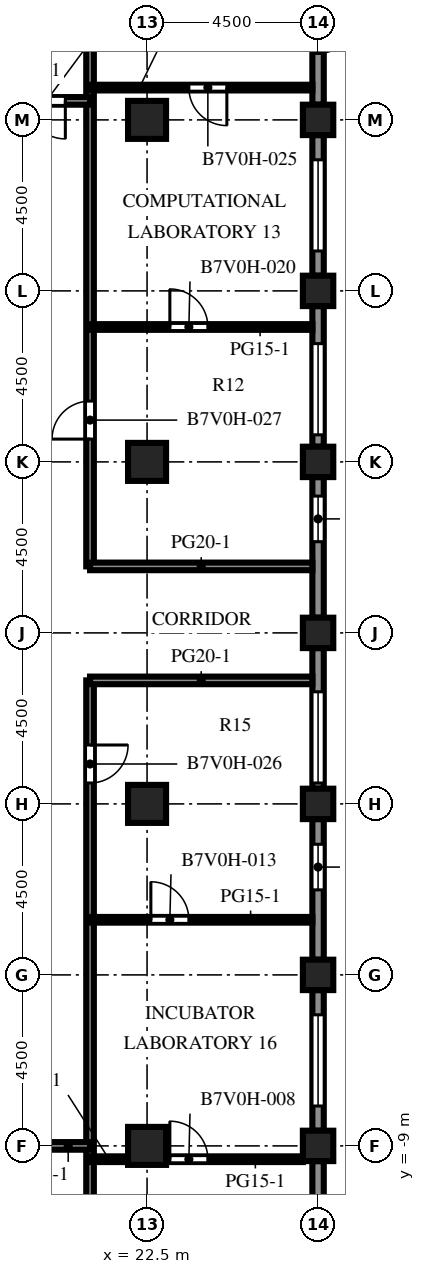
"""IFC4 building model, lengths in metres.
Left out: names, types, materials, properties, quantities, classifications, styles, units other than length and angle.
Written with IfcOpenShell. Run it as: python <this file> out.ifc"""

import sys

from ifc_helpers import new_model, si_unit, direction, frame, frame_2d, origin, origin_2d, place, context, subcontext, project, spatial, rectangle, extrude, element, fill, save


model = new_model("IFC4")
c1 = context("Model", 3, precision=1e-05, world=origin(), true_north=direction((0.0, 1.0)))
c2 = subcontext(c1, "Body", "Model", "MODEL_VIEW")
j1 = project(units=[si_unit("LENGTHUNIT", "METRE"), si_unit("PLANEANGLEUNIT", "RADIAN")], contexts=[c1])
p1 = place(None, origin())
s1 = spatial("IfcSite", under=j1, at=p1, CompositionType="ELEMENT")
p2 = place(p1, origin())
s2 = spatial("IfcBuilding", under=s1, at=p2, CompositionType="ELEMENT")
p3 = place(p2, frame((0.0, 0.0, 231.6)))
s3 = spatial("IfcBuildingStorey", under=s2, at=p3, CompositionType="ELEMENT", Elevation=231.6)
for number, where, z_axis, x_axis in (
    (1, (27.0, -9.0, 0.0), (0.0, 0.0, 1.0), (1.0, 0.0, 0.0)),
    (2, (27.0, -4.5, 0.0), (0.0, 0.0, 1.0), (1.0, 0.0, 0.0)),
    (3, (27.0, 0.0, 0.0), (0.0, 0.0, 1.0), (1.0, 0.0, 0.0)),
    (4, (27.0, 4.5, 0.0), (0.0, 0.0, 1.0), (1.0, 0.0, 0.0)),
    (5, (27.0, 9.0, 0.0), (0.0, 0.0, 1.0), (1.0, 0.0, 0.0)),
    (6, (27.0, 13.5, 0.0), (0.0, 0.0, 1.0), (1.0, 0.0, 0.0)),
    (7, (27.0, 18.0, 0.0), (0.0, 0.0, 1.0), (1.0, 0.0, 0.0)),
):
    element("IfcColumn", number, at=place(p3, frame(where, z_axis=z_axis, x_axis=x_axis)), inside=s3, PredefinedType="COLUMN", context=c2, shape_type="SweptSolid", body=[
        extrude(rectangle(XDim=0.8, YDim=0.8, at=origin_2d()), origin(), (0.0, 0.0, 1.0), 4.1),
    ])
for number, where, z_axis, x_axis in (
    (8, (22.5, -9.0, 0.0), (0.0, 0.0, 1.0), (1.0, 0.0, 0.0)),
    (9, (22.5, 0.0, 0.0), (0.0, 0.0, 1.0), (1.0, 0.0, 0.0)),
    (10, (22.5, 9.0, 0.0), (0.0, 0.0, 1.0), (1.0, 0.0, 0.0)),
    (11, (22.5, 18.0, 0.0), (0.0, 0.0, 1.0), (1.0, 0.0, 0.0)),
):
    element("IfcColumn", number, at=place(p3, frame(where, z_axis=z_axis, x_axis=x_axis)), inside=s3, PredefinedType="COLUMN", context=c2, shape_type="SweptSolid", body=[
        extrude(rectangle(XDim=1.0, YDim=1.0, at=origin_2d()), origin(), (0.0, 0.0, 1.0), 4.1),
    ])
p4 = place(p3, frame((27.0, -9.4, 0.0), z_axis=(0.0, 0.0, 1.0), x_axis=(0.0, -1.0, 0.0)))
e12 = element("IfcWall", 12, at=p4, inside=s3, PredefinedType="SOLIDWALL", context=c2, shape_type="SweptSolid", body=[
    extrude(rectangle(XDim=3.7, YDim=0.3, at=frame_2d((1.85, 0.0))), origin(), (0.0, 0.0, 1.0), 2.85),
])
p5 = place(p4, frame((1.35, 0.0, 0.0)))
e13 = element("IfcOpeningElement", 13, at=p5, cuts=e12, PredefinedType="OPENING", context=c2, shape_type="SweptSolid", body=[
    extrude(rectangle(XDim=1.0, YDim=2.2, at=frame_2d((0.5, 1.1))), frame((0.0, 0.16, 0.0), z_axis=(0.0, -1.0, 0.0), x_axis=(1.0, 0.0, 0.0)), (0.0, 0.0, 1.0), 0.32),
])
p6 = place(p3, frame((27.0, -4.9, 0.0), z_axis=(0.0, 0.0, 1.0), x_axis=(0.0, -1.0, 0.0)))
e14 = element("IfcWall", 14, at=p6, inside=s3, PredefinedType="SOLIDWALL", context=c2, shape_type="SweptSolid", body=[
    extrude(rectangle(XDim=3.7, YDim=0.3, at=frame_2d((1.85, 0.0))), origin(), (0.0, 0.0, 1.0), 2.85),
])
p7 = place(p6, frame((0.65, 0.0, 0.8)))
e15 = element("IfcOpeningElement", 15, at=p7, cuts=e14, PredefinedType="OPENING", context=c2, shape_type="SweptSolid", body=[
    extrude(rectangle(XDim=2.4, YDim=1.7, at=frame_2d((1.2, 0.85))), frame((0.0, 0.16, 0.0), z_axis=(0.0, -1.0, 0.0), x_axis=(1.0, 0.0, 0.0)), (0.0, 0.0, 1.0), 0.32),
])
p8 = place(p3, frame((27.0, -0.4, 0.0), z_axis=(0.0, 0.0, 1.0), x_axis=(0.0, -1.0, 0.0)))
e16 = element("IfcWall", 16, at=p8, inside=s3, PredefinedType="SOLIDWALL", context=c2, shape_type="SweptSolid", body=[
    extrude(rectangle(XDim=3.7, YDim=0.3, at=frame_2d((1.85, 0.0))), origin(), (0.0, 0.0, 1.0), 2.85),
])
p9 = place(p8, frame((0.663, 0.0, 0.8)))
e17 = element("IfcOpeningElement", 17, at=p9, cuts=e16, PredefinedType="OPENING", context=c2, shape_type="SweptSolid", body=[
    extrude(rectangle(XDim=1.2, YDim=1.7, at=frame_2d((0.6, 0.85))), frame((0.0, 0.16, 0.0), z_axis=(0.0, -1.0, 0.0), x_axis=(1.0, 0.0, 0.0)), (0.0, 0.0, 1.0), 0.32),
])
p10 = place(p3, frame((27.0, 4.1, 0.0), z_axis=(0.0, 0.0, 1.0), x_axis=(0.0, -1.0, 0.0)))
e18 = element("IfcWall", 18, at=p10, inside=s3, PredefinedType="SOLIDWALL", context=c2, shape_type="SweptSolid", body=[
    extrude(rectangle(XDim=3.7, YDim=0.3, at=frame_2d((1.85, 0.0))), origin(), (0.0, 0.0, 1.0), 2.85),
])
p11 = place(p10, frame((1.15, 0.0, 0.8)))
e19 = element("IfcOpeningElement", 19, at=p11, cuts=e18, PredefinedType="OPENING", context=c2, shape_type="SweptSolid", body=[
    extrude(rectangle(XDim=2.4, YDim=1.7, at=frame_2d((1.2, 0.85))), frame((0.0, 0.16, 0.0), z_axis=(0.0, -1.0, 0.0), x_axis=(1.0, 0.0, 0.0)), (0.0, 0.0, 1.0), 0.32),
])
p12 = place(p3, frame((27.0, 8.6, 0.0), z_axis=(0.0, 0.0, 1.0), x_axis=(0.0, -1.0, 0.0)))
e20 = element("IfcWall", 20, at=p12, inside=s3, PredefinedType="SOLIDWALL", context=c2, shape_type="SweptSolid", body=[
    extrude(rectangle(XDim=3.7, YDim=0.3, at=frame_2d((1.85, 0.0))), origin(), (0.0, 0.0, 1.0), 2.85),
])
p13 = place(p12, frame((0.5, 0.0, 0.8)))
e21 = element("IfcOpeningElement", 21, at=p13, cuts=e20, PredefinedType="OPENING", context=c2, shape_type="SweptSolid", body=[
    extrude(rectangle(XDim=1.2, YDim=1.7, at=frame_2d((0.6, 0.85))), frame((0.0, 0.16, 0.0), z_axis=(0.0, -1.0, 0.0), x_axis=(1.0, 0.0, 0.0)), (0.0, 0.0, 1.0), 0.32),
])
p14 = place(p3, frame((27.0, 13.1, 0.0), z_axis=(0.0, 0.0, 1.0), x_axis=(0.0, -1.0, 0.0)))
e22 = element("IfcWall", 22, at=p14, inside=s3, PredefinedType="SOLIDWALL", context=c2, shape_type="SweptSolid", body=[
    extrude(rectangle(XDim=3.7, YDim=0.3, at=frame_2d((1.85, 0.0))), origin(), (0.0, 0.0, 1.0), 2.85),
])
p15 = place(p14, frame((0.988, 0.0, 0.8)))
e23 = element("IfcOpeningElement", 23, at=p15, cuts=e22, PredefinedType="OPENING", context=c2, shape_type="SweptSolid", body=[
    extrude(rectangle(XDim=2.4, YDim=1.7, at=frame_2d((1.2, 0.85))), frame((0.0, 0.16, 0.0), z_axis=(0.0, -1.0, 0.0), x_axis=(1.0, 0.0, 0.0)), (0.0, 0.0, 1.0), 0.32),
])
p16 = place(p3, frame((27.0, 17.6, 0.0), z_axis=(0.0, 0.0, 1.0), x_axis=(0.0, -1.0, 0.0)))
e24 = element("IfcWall", 24, at=p16, inside=s3, PredefinedType="SOLIDWALL", context=c2, shape_type="SweptSolid", body=[
    extrude(rectangle(XDim=3.7, YDim=0.3, at=frame_2d((1.85, 0.0))), origin(), (0.0, 0.0, 1.0), 2.85),
])
p17 = place(p16, frame((0.65, 0.0, 0.8)))
e25 = element("IfcOpeningElement", 25, at=p17, cuts=e24, PredefinedType="OPENING", context=c2, shape_type="SweptSolid", body=[
    extrude(rectangle(XDim=2.4, YDim=1.7, at=frame_2d((1.2, 0.85))), frame((0.0, 0.16, 0.0), z_axis=(0.0, -1.0, 0.0), x_axis=(1.0, 0.0, 0.0)), (0.0, 0.0, 1.0), 0.32),
])
p18 = place(p3, frame((27.0, 22.1, 0.0), z_axis=(0.0, 0.0, 1.0), x_axis=(0.0, -1.0, 0.0)))
e26 = element("IfcWall", 26, at=p18, inside=s3, PredefinedType="SOLIDWALL", context=c2, shape_type="SweptSolid", body=[
    extrude(rectangle(XDim=3.7, YDim=0.3, at=frame_2d((1.85, 0.0))), origin(), (0.0, 0.0, 1.0), 2.85),
])
p19 = place(p18, frame((1.35, 0.0, 0.0)))
e27 = element("IfcOpeningElement", 27, at=p19, cuts=e26, PredefinedType="OPENING", context=c2, shape_type="SweptSolid", body=[
    extrude(rectangle(XDim=1.0, YDim=2.2, at=frame_2d((0.5, 1.1))), frame((0.0, 0.16, 0.0), z_axis=(0.0, -1.0, 0.0), x_axis=(1.0, 0.0, 0.0)), (0.0, 0.0, 1.0), 0.32),
])
p20 = place(p3, frame((21.0, 3.25, 0.0), z_axis=(0.0, 0.0, 1.0), x_axis=(0.0, -1.0, 0.0)))
e28 = element("IfcWall", 28, at=p20, inside=s3, PredefinedType="PARTITIONING", context=c2, shape_type="SweptSolid", body=[
    extrude(rectangle(XDim=25.6, YDim=0.2, at=frame_2d((12.8, 0.0))), origin(), (0.0, 0.0, 1.0), 3.65),
])
p21 = place(p20, frame((1.7, 0.0, 0.0)))
e29 = element("IfcOpeningElement", 29, at=p21, cuts=e28, PredefinedType="OPENING", context=c2, shape_type="SweptSolid", body=[
    extrude(rectangle(XDim=1.0, YDim=2.1, at=frame_2d((0.5, 1.05))), frame((0.0, 0.11, 0.0), z_axis=(0.0, -1.0, 0.0), x_axis=(1.0, 0.0, 0.0)), (0.0, 0.0, 1.0), 0.22),
])
p22 = place(p3, frame((21.0, 31.35, 0.0), z_axis=(0.0, 0.0, 1.0), x_axis=(0.0, -1.0, 0.0)))
e30 = element("IfcWall", 30, at=p22, inside=s3, PredefinedType="PARTITIONING", context=c2, shape_type="SweptSolid", body=[
    extrude(rectangle(XDim=25.1, YDim=0.2, at=frame_2d((12.55, 0.0))), origin(), (0.0, 0.0, 1.0), 3.65),
])
p23 = place(p22, frame((20.75, 0.0, 0.0)))
e31 = element("IfcOpeningElement", 31, at=p23, cuts=e30, PredefinedType="OPENING", context=c2, shape_type="SweptSolid", body=[
    extrude(rectangle(XDim=1.0, YDim=2.1, at=frame_2d((0.5, 1.05))), frame((0.0, 0.11, 0.0), z_axis=(0.0, -1.0, 0.0), x_axis=(1.0, 0.0, 0.0)), (0.0, 0.0, 1.0), 0.22),
])
p24 = place(p3, frame((21.0, -9.35, 0.0), z_axis=(0.0, 0.0, 1.0), x_axis=(1.0, 0.0, 0.0)))
e32 = element("IfcWall", 32, at=p24, inside=s3, PredefinedType="PARTITIONING", context=c2, shape_type="SweptSolid", body=[
    extrude(rectangle(XDim=1.0, YDim=0.15, at=frame_2d((0.5, 0.0))), origin(), (0.0, 0.0, 1.0), 3.65),
])
p25 = place(p3, frame((26.6, -9.35, 0.0), z_axis=(0.0, 0.0, 1.0), x_axis=(-1.0, 0.0, 0.0)))
e33 = element("IfcWall", 33, at=p25, inside=s3, PredefinedType="PARTITIONING", context=c2, shape_type="SweptSolid", body=[
    extrude(rectangle(XDim=3.6, YDim=0.15, at=frame_2d((1.8, 0.0))), origin(), (0.0, 0.0, 1.0), 3.65),
])
p26 = place(p25, frame((2.5, 0.0, 0.0)))
e34 = element("IfcOpeningElement", 34, at=p26, cuts=e33, PredefinedType="OPENING", context=c2, shape_type="SweptSolid", body=[
    extrude(rectangle(XDim=1.0, YDim=2.1, at=frame_2d((0.5, 1.05))), frame((0.0, 0.085, 0.0), z_axis=(0.0, -1.0, 0.0), x_axis=(1.0, 0.0, 0.0)), (0.0, 0.0, 1.0), 0.17),
])
p27 = place(p3, frame((21.0, -9.0, 0.0), z_axis=(0.0, 0.0, 1.0), x_axis=(-1.0, 0.0, 0.0)))
e35 = element("IfcWall", 35, at=p27, inside=s3, PredefinedType="PARTITIONING", context=c2, shape_type="SweptSolid", body=[
    extrude(rectangle(XDim=3.0, YDim=0.2, at=frame_2d((1.5, 0.0))), origin(), (0.0, 0.0, 1.0), 3.65),
])
p28 = place(p27, frame((1.15, 0.0, 0.0)))
e36 = element("IfcOpeningElement", 36, at=p28, cuts=e35, PredefinedType="OPENING", context=c2, shape_type="SweptSolid", body=[
    extrude(rectangle(XDim=1.0, YDim=2.1, at=frame_2d((0.5, 1.05))), frame((0.0, 0.11, 0.0), z_axis=(0.0, -1.0, 0.0), x_axis=(1.0, 0.0, 0.0)), (0.0, 0.0, 1.0), 0.22),
])
p29 = place(p3, frame((26.85, -3.05, 0.0), z_axis=(0.0, 0.0, 1.0), x_axis=(-1.0, 0.0, 0.0)))
e37 = element("IfcWall", 37, at=p29, inside=s3, PredefinedType="PARTITIONING", context=c2, shape_type="SweptSolid", body=[
    extrude(rectangle(XDim=5.85, YDim=0.15, at=frame_2d((2.925, 0.0))), origin(), (0.0, 0.0, 1.0), 3.65),
])
p30 = place(p29, frame((3.25, 0.0, 0.0)))
e38 = element("IfcOpeningElement", 38, at=p30, cuts=e37, PredefinedType="OPENING", context=c2, shape_type="SweptSolid", body=[
    extrude(rectangle(XDim=1.0, YDim=2.1, at=frame_2d((0.5, 1.05))), frame((0.0, 0.085, 0.0), z_axis=(0.0, -1.0, 0.0), x_axis=(1.0, 0.0, 0.0)), (0.0, 0.0, 1.0), 0.17),
])
for number, where, z_axis, x_axis in (
    (39, (21.0, 3.25, 0.0), (0.0, 0.0, 1.0), (1.0, 0.0, 0.0)),
    (40, (21.0, 6.25, 0.0), (0.0, 0.0, 1.0), (1.0, 0.0, 0.0)),
):
    element("IfcWall", number, at=place(p3, frame(where, z_axis=z_axis, x_axis=x_axis)), inside=s3, PredefinedType="PARTITIONING", context=c2, shape_type="SweptSolid", body=[
        extrude(rectangle(XDim=5.85, YDim=0.2, at=frame_2d((2.925, 0.0))), origin(), (0.0, 0.0, 1.0), 3.65),
    ])
p31 = place(p3, frame((21.0, 12.55, 0.0), z_axis=(0.0, 0.0, 1.0), x_axis=(1.0, 0.0, 0.0)))
e41 = element("IfcWall", 41, at=p31, inside=s3, PredefinedType="PARTITIONING", context=c2, shape_type="SweptSolid", body=[
    extrude(rectangle(XDim=5.85, YDim=0.15, at=frame_2d((2.925, 0.0))), origin(), (0.0, 0.0, 1.0), 3.65),
])
p32 = place(p31, frame((2.1, 0.0, 0.0)))
e42 = element("IfcOpeningElement", 42, at=p32, cuts=e41, PredefinedType="OPENING", context=c2, shape_type="SweptSolid", body=[
    extrude(rectangle(XDim=1.0, YDim=2.1, at=frame_2d((0.5, 1.05))), frame((0.0, 0.085, 0.0), z_axis=(0.0, -1.0, 0.0), x_axis=(1.0, 0.0, 0.0)), (0.0, 0.0, 1.0), 0.17),
])
p33 = place(p3, frame((18.0, 18.5, 0.0), z_axis=(0.0, 0.0, 1.0), x_axis=(1.0, 0.0, 0.0)))
e43 = element("IfcWall", 43, at=p33, inside=s3, PredefinedType="PARTITIONING", context=c2, shape_type="SweptSolid", body=[
    extrude(rectangle(XDim=3.0, YDim=0.2, at=frame_2d((1.5, 0.0))), origin(), (0.0, 0.0, 1.0), 3.65),
])
p34 = place(p33, frame((1.35, 0.0, 0.0)))
e44 = element("IfcOpeningElement", 44, at=p34, cuts=e43, PredefinedType="OPENING", context=c2, shape_type="SweptSolid", body=[
    extrude(rectangle(XDim=1.0, YDim=2.1, at=frame_2d((0.5, 1.05))), frame((0.0, 0.11, 0.0), z_axis=(0.0, -1.0, 0.0), x_axis=(1.0, 0.0, 0.0)), (0.0, 0.0, 1.0), 0.22),
])
p35 = place(p3, frame((21.0, 18.85, 0.0), z_axis=(0.0, 0.0, 1.0), x_axis=(1.0, 0.0, 0.0)))
e45 = element("IfcWall", 45, at=p35, inside=s3, PredefinedType="PARTITIONING", context=c2, shape_type="SweptSolid", body=[
    extrude(rectangle(XDim=5.85, YDim=0.15, at=frame_2d((2.925, 0.0))), origin(), (0.0, 0.0, 1.0), 3.65),
])
p36 = place(p35, frame((2.6, 0.0, 0.0)))
e46 = element("IfcOpeningElement", 46, at=p36, cuts=e45, PredefinedType="OPENING", context=c2, shape_type="SweptSolid", body=[
    extrude(rectangle(XDim=1.0, YDim=2.1, at=frame_2d((0.5, 1.05))), frame((0.0, 0.085, 0.0), z_axis=(0.0, -1.0, 0.0), x_axis=(1.0, 0.0, 0.0)), (0.0, 0.0, 1.0), 0.17),
])
p37 = place(p7, origin())
e47 = element("IfcWindow", 47, at=p37, inside=s3, PartitioningType="SINGLE_PANEL", PredefinedType="WINDOW", context=c2, shape_type="SweptSolid", body=[
    extrude(rectangle(XDim=2.4, YDim=1.7, at=frame_2d((1.2, 0.85))), frame((0.0, 0.03, 0.0), z_axis=(0.0, -1.0, 0.0), x_axis=(1.0, 0.0, 0.0)), (0.0, 0.0, 1.0), 0.06),
])
fill(e15, e47)
p38 = place(p9, origin())
e48 = element("IfcWindow", 48, at=p38, inside=s3, PartitioningType="SINGLE_PANEL", PredefinedType="WINDOW", context=c2, shape_type="SweptSolid", body=[
    extrude(rectangle(XDim=1.2, YDim=1.7, at=frame_2d((0.6, 0.85))), frame((0.0, 0.03, 0.0), z_axis=(0.0, -1.0, 0.0), x_axis=(1.0, 0.0, 0.0)), (0.0, 0.0, 1.0), 0.06),
])
fill(e17, e48)
p39 = place(p11, origin())
e49 = element("IfcWindow", 49, at=p39, inside=s3, PartitioningType="SINGLE_PANEL", PredefinedType="WINDOW", context=c2, shape_type="SweptSolid", body=[
    extrude(rectangle(XDim=2.4, YDim=1.7, at=frame_2d((1.2, 0.85))), frame((0.0, 0.03, 0.0), z_axis=(0.0, -1.0, 0.0), x_axis=(1.0, 0.0, 0.0)), (0.0, 0.0, 1.0), 0.06),
])
fill(e19, e49)
p40 = place(p13, origin())
e50 = element("IfcWindow", 50, at=p40, inside=s3, PartitioningType="SINGLE_PANEL", PredefinedType="WINDOW", context=c2, shape_type="SweptSolid", body=[
    extrude(rectangle(XDim=1.2, YDim=1.7, at=frame_2d((0.6, 0.85))), frame((0.0, 0.03, 0.0), z_axis=(0.0, -1.0, 0.0), x_axis=(1.0, 0.0, 0.0)), (0.0, 0.0, 1.0), 0.06),
])
fill(e21, e50)
p41 = place(p15, origin())
e51 = element("IfcWindow", 51, at=p41, inside=s3, PartitioningType="SINGLE_PANEL", PredefinedType="WINDOW", context=c2, shape_type="SweptSolid", body=[
    extrude(rectangle(XDim=2.4, YDim=1.7, at=frame_2d((1.2, 0.85))), frame((0.0, 0.03, 0.0), z_axis=(0.0, -1.0, 0.0), x_axis=(1.0, 0.0, 0.0)), (0.0, 0.0, 1.0), 0.06),
])
fill(e23, e51)
p42 = place(p17, origin())
e52 = element("IfcWindow", 52, at=p42, inside=s3, PartitioningType="SINGLE_PANEL", PredefinedType="WINDOW", context=c2, shape_type="SweptSolid", body=[
    extrude(rectangle(XDim=2.4, YDim=1.7, at=frame_2d((1.2, 0.85))), frame((0.0, 0.03, 0.0), z_axis=(0.0, -1.0, 0.0), x_axis=(1.0, 0.0, 0.0)), (0.0, 0.0, 1.0), 0.06),
])
fill(e25, e52)
p43 = place(p19, origin())
e53 = element("IfcDoor", 53, at=p43, inside=s3, OperationType="SINGLE_SWING_LEFT", PredefinedType="DOOR", context=c2, shape_type="SweptSolid", body=[
    extrude(rectangle(XDim=1.0, YDim=2.2, at=frame_2d((0.5, 1.1))), frame((0.0, 0.025, 0.0), z_axis=(0.0, -1.0, 0.0), x_axis=(1.0, 0.0, 0.0)), (0.0, 0.0, 1.0), 0.05),
])
fill(e27, e53)
p44 = place(p26, origin())
e54 = element("IfcDoor", 54, at=p44, inside=s3, OperationType="SINGLE_SWING_RIGHT", PredefinedType="DOOR", context=c2, shape_type="SweptSolid", body=[
    extrude(rectangle(XDim=1.0, YDim=2.1, at=frame_2d((0.5, 1.05))), frame((0.0, 0.025, 0.0), z_axis=(0.0, -1.0, 0.0), x_axis=(1.0, 0.0, 0.0)), (0.0, 0.0, 1.0), 0.05),
])
fill(e34, e54)
p45 = place(p30, origin())
e55 = element("IfcDoor", 55, at=p45, inside=s3, OperationType="SINGLE_SWING_RIGHT", PredefinedType="DOOR", context=c2, shape_type="SweptSolid", body=[
    extrude(rectangle(XDim=1.0, YDim=2.1, at=frame_2d((0.5, 1.05))), frame((0.0, 0.025, 0.0), z_axis=(0.0, -1.0, 0.0), x_axis=(1.0, 0.0, 0.0)), (0.0, 0.0, 1.0), 0.05),
])
fill(e38, e55)
p46 = place(p32, origin())
e56 = element("IfcDoor", 56, at=p46, inside=s3, OperationType="SINGLE_SWING_LEFT", PredefinedType="DOOR", context=c2, shape_type="SweptSolid", body=[
    extrude(rectangle(XDim=1.0, YDim=2.1, at=frame_2d((0.5, 1.05))), frame((0.0, 0.025, 0.0), z_axis=(0.0, -1.0, 0.0), x_axis=(1.0, 0.0, 0.0)), (0.0, 0.0, 1.0), 0.05),
])
fill(e42, e56)
p47 = place(p34, origin())
e57 = element("IfcDoor", 57, at=p47, inside=s3, OperationType="SINGLE_SWING_RIGHT", PredefinedType="DOOR", context=c2, shape_type="SweptSolid", body=[
    extrude(rectangle(XDim=1.0, YDim=2.1, at=frame_2d((0.5, 1.05))), frame((0.0, 0.025, 0.0), z_axis=(0.0, -1.0, 0.0), x_axis=(1.0, 0.0, 0.0)), (0.0, 0.0, 1.0), 0.05),
])
fill(e44, e57)
p48 = place(p36, origin())
e58 = element("IfcDoor", 58, at=p48, inside=s3, OperationType="SINGLE_SWING_RIGHT", PredefinedType="DOOR", context=c2, shape_type="SweptSolid", body=[
    extrude(rectangle(XDim=1.0, YDim=2.1, at=frame_2d((0.5, 1.05))), frame((0.0, 0.025, 0.0), z_axis=(0.0, -1.0, 0.0), x_axis=(1.0, 0.0, 0.0)), (0.0, 0.0, 1.0), 0.05),
])
fill(e46, e58)
p49 = place(p21, origin())
e59 = element("IfcDoor", 59, at=p49, inside=s3, OperationType="SINGLE_SWING_LEFT", PredefinedType="DOOR", context=c2, shape_type="SweptSolid", body=[
    extrude(rectangle(XDim=1.0, YDim=2.1, at=frame_2d((0.5, 1.05))), frame((0.0, 0.025, 0.0), z_axis=(0.0, -1.0, 0.0), x_axis=(1.0, 0.0, 0.0)), (0.0, 0.0, 1.0), 0.05),
])
fill(e29, e59)
p50 = place(p23, origin())
e60 = element("IfcDoor", 60, at=p50, inside=s3, OperationType="SINGLE_SWING_RIGHT", PredefinedType="DOOR", context=c2, shape_type="SweptSolid", body=[
    extrude(rectangle(XDim=1.0, YDim=2.1, at=frame_2d((0.5, 1.05))), frame((0.0, 0.025, 0.0), z_axis=(0.0, -1.0, 0.0), x_axis=(1.0, 0.0, 0.0)), (0.0, 0.0, 1.0), 0.05),
])
fill(e31, e60)
save(model, sys.argv[1])
